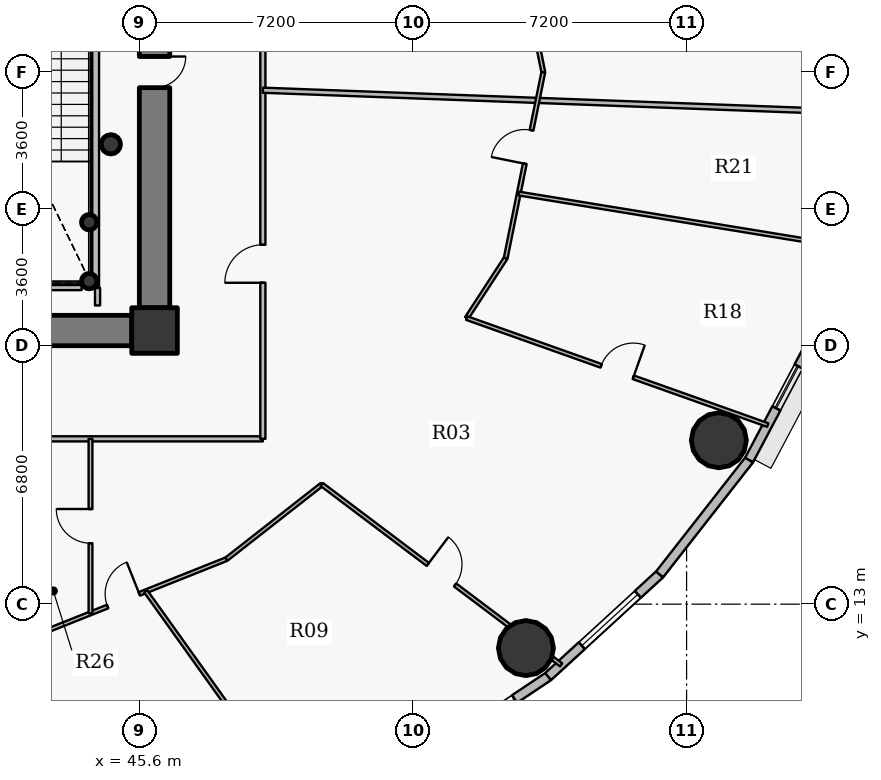
"""IFC4 building model, lengths in metres.
Left out: names, types, materials, properties, quantities, classifications, styles, units other than length and angle.
Written with IfcOpenShell. Run it as: python <this file> out.ifc"""

import sys

from ifc_helpers import new_model, si_unit, direction, frame, frame_2d, origin, origin_2d, place, context, subcontext, project, spatial, rectangle, hollow_circle, extrude, source, transform, mapped, element, fill, save


model = new_model("IFC4")
c1 = context("Model", 3, precision=1e-05, world=origin(), true_north=direction((0.0, 1.0)))
c2 = subcontext(c1, "Body", "Model", "MODEL_VIEW")
j1 = project(units=[si_unit("LENGTHUNIT", "METRE"), si_unit("PLANEANGLEUNIT", "RADIAN")], contexts=[c1])
p1 = place(None, origin())
s1 = spatial("IfcSite", under=j1, at=p1, CompositionType="ELEMENT")
p2 = place(p1, origin())
s2 = spatial("IfcBuilding", under=s1, at=p2, CompositionType="ELEMENT")
p3 = place(p2, frame((0.0, 0.0, 108.45)))
s3 = spatial("IfcBuildingStorey", under=s2, at=p3, CompositionType="ELEMENT", Elevation=108.45)
p4 = place(p3, frame((46.0, 20.2, 0.0), z_axis=(0.0, 0.0, 1.0), x_axis=(1.0, 0.0, 0.0)))
e1 = element("IfcColumn", 1, at=p4, inside=s3, PredefinedType="COLUMN", context=c2, shape_type="SweptSolid", body=[
    extrude(rectangle(XDim=1.2, YDim=1.2, at=origin_2d()), origin(), (0.0, 0.0, 1.0), 3.75),
])
for number, where, z_axis, x_axis in (
    (2, (44.28, 21.5, 0.0), (0.0, 0.0, 1.0), (1.0, 0.0, 0.0)),
    (3, (44.28, 23.05, 0.0), (0.0, 0.0, 1.0), (1.0, 0.0, 0.0)),
):
    element("IfcColumn", number, at=place(p3, frame(where, z_axis=z_axis, x_axis=x_axis)), inside=s3, PredefinedType="COLUMN", context=c2, shape_type="SweptSolid", body=[
        extrude(hollow_circle(Radius=0.203, WallThickness=0.016, at=origin_2d()), origin(), (0.0, 0.0, 1.0), 3.75),
    ])
p5 = place(p3, frame((46.0, 33.2, 0.0), z_axis=(0.0, 0.0, 1.0), x_axis=(0.0, -1.0, 0.0)))
e4 = element("IfcWall", 4, at=p5, inside=s3, PredefinedType="SHEAR", context=c2, shape_type="SweptSolid", body=[
    extrude(rectangle(XDim=12.4, YDim=0.8, at=frame_2d((6.2, 0.0))), origin(), (0.0, 0.0, 1.0), 2.95),
])
p6 = place(p5, frame((5.79, 0.0, 0.0)))
e5 = element("IfcOpeningElement", 5, at=p6, cuts=e4, PredefinedType="OPENING", context=c2, shape_type="SweptSolid", body=[
    extrude(rectangle(XDim=0.82, YDim=2.1, at=origin_2d()), frame((0.41, 0.41, 1.05), z_axis=(0.0, -1.0, 0.0), x_axis=(1.0, 0.0, 0.0)), (0.0, 0.0, 1.0), 0.82),
])
p7 = place(p3, frame((45.4, 20.2, 0.0), z_axis=(0.0, 0.0, 1.0), x_axis=(-1.0, 0.0, 0.0)))
e6 = element("IfcWall", 6, at=p7, inside=s3, PredefinedType="SHEAR", context=c2, shape_type="SweptSolid", body=[
    extrude(rectangle(XDim=18.8, YDim=0.8, at=frame_2d((9.4, 0.0))), origin(), (0.0, 0.0, 1.0), 2.95),
])
p8 = place(p7, frame((10.15, 0.0, 0.0)))
e7 = element("IfcOpeningElement", 7, at=p8, cuts=e6, PredefinedType="OPENING", context=c2, shape_type="SweptSolid", body=[
    extrude(rectangle(XDim=1.15, YDim=2.15, at=origin_2d()), frame((0.575, 0.41, 1.075), z_axis=(0.0, -1.0, 0.0), x_axis=(1.0, 0.0, 0.0)), (0.0, 0.0, 1.0), 0.82),
])
for number, where, z_axis, x_axis in (
    (8, (55.773, 11.844, 0.0), (0.0, 0.0, 1.0), (1.0, 0.0, 0.0)),
    (9, (60.849, 17.312, 0.0), (0.0, 0.0, 1.0), (1.0, 0.0, 0.0)),
):
    element("IfcColumn", number, at=place(p3, frame(where, z_axis=z_axis, x_axis=x_axis)), inside=s3, PredefinedType="COLUMN", context=c2, shape_type="SweptSolid", body=[
        extrude(hollow_circle(Radius=0.725, WallThickness=0.042, at=origin_2d()), origin(), (0.0, 0.0, 1.0), 3.75),
    ])
p9 = place(p3, frame((44.85, 25.1, 0.0), z_axis=(0.0, 0.0, 1.0), x_axis=(1.0, 0.0, 0.0)))
e10 = element("IfcColumn", 10, at=p9, inside=s3, PredefinedType="COLUMN", context=c2, shape_type="SweptSolid", body=[
    extrude(hollow_circle(Radius=0.254, WallThickness=0.02, at=origin_2d()), origin(), (0.0, 0.0, 1.0), 3.75),
])
p10 = place(p3, frame((56.358, 11.097, 0.0), z_axis=(0.0, 0.0, 1.0), x_axis=(-0.831221811447, -0.555940914284, 0.0)))
e11 = element("IfcWall", 11, at=p10, inside=s3, PredefinedType="SOLIDWALL", context=c2, shape_type="SweptSolid", body=[
    extrude(rectangle(XDim=4.13, YDim=0.24, at=frame_2d((2.065, 0.0))), origin(), (0.0, 0.0, 1.0), 3.5),
])
p11 = place(p10, frame((1.065, 0.0, 0.9)))
e12 = element("IfcOpeningElement", 12, at=p11, cuts=e11, PredefinedType="OPENING", context=c2, shape_type="SweptSolid", body=[
    extrude(rectangle(XDim=2.0, YDim=1.75, at=origin_2d()), frame((1.0, 0.13, 0.875), z_axis=(0.0, -1.0, 0.0), x_axis=(1.0, 0.0, 0.0)), (0.0, 0.0, 1.0), 0.26),
])
p12 = place(p3, frame((59.289, 13.783, 0.0), z_axis=(0.0, 0.0, 1.0), x_axis=(-0.737113356241, -0.675769117414, 0.0)))
e13 = element("IfcWall", 13, at=p12, inside=s3, PredefinedType="SOLIDWALL", context=c2, shape_type="SweptSolid", body=[
    extrude(rectangle(XDim=3.976, YDim=0.24, at=frame_2d((1.988, 0.0))), origin(), (0.0, 0.0, 1.0), 3.5),
])
p13 = place(p12, frame((0.776, 0.0, 0.9)))
e14 = element("IfcOpeningElement", 14, at=p13, cuts=e13, PredefinedType="OPENING", context=c2, shape_type="SweptSolid", body=[
    extrude(rectangle(XDim=2.0, YDim=1.75, at=origin_2d()), frame((1.0, 0.13, 0.875), z_axis=(0.0, -1.0, 0.0), x_axis=(1.0, 0.0, 0.0)), (0.0, 0.0, 1.0), 0.26),
])
p14 = place(p3, frame((61.645, 16.794, 0.0), z_axis=(0.0, 0.0, 1.0), x_axis=(-0.616272103517, -0.787533297345, 0.0)))
e15 = element("IfcWall", 15, at=p14, inside=s3, PredefinedType="SOLIDWALL", context=c2, shape_type="SweptSolid", body=[
    extrude(rectangle(XDim=3.823, YDim=0.24, at=frame_2d((1.912, 0.0))), origin(), (0.0, 0.0, 1.0), 3.5),
])
p15 = place(p3, frame((63.37, 20.055, 0.0), z_axis=(0.0, 0.0, 1.0), x_axis=(-0.467614004126, -0.883932770716, 0.0)))
e16 = element("IfcWall", 16, at=p15, inside=s3, PredefinedType="SOLIDWALL", context=c2, shape_type="SweptSolid", body=[
    extrude(rectangle(XDim=3.689, YDim=0.24, at=frame_2d((1.844, 0.0))), origin(), (0.0, 0.0, 1.0), 3.5),
])
p16 = place(p15, frame((0.904, 0.0, 0.9)))
e17 = element("IfcOpeningElement", 17, at=p16, cuts=e16, PredefinedType="OPENING", context=c2, shape_type="SweptSolid", body=[
    extrude(rectangle(XDim=1.25, YDim=1.65, at=origin_2d()), frame((0.625, 0.13, 0.825), z_axis=(0.0, -1.0, 0.0), x_axis=(1.0, 0.0, 0.0)), (0.0, 0.0, 1.0), 0.26),
])
p17 = place(p3, frame((38.477, 17.35, 0.0), z_axis=(0.0, 0.0, 1.0), x_axis=(1.0, 0.0, 0.0)))
e18 = element("IfcWall", 18, at=p17, inside=s3, PredefinedType="PARTITIONING", context=c2, shape_type="SweptSolid", body=[
    extrude(rectangle(XDim=10.373, YDim=0.135, at=frame_2d((5.187, 0.0))), origin(), (0.0, 0.0, 1.0), 2.935),
])
p18 = place(p3, frame((42.251, 11.934, 0.0), z_axis=(0.0, 0.0, 1.0), x_axis=(0.928803554156, 0.370572473055, 0.0)))
e19 = element("IfcWall", 19, at=p18, inside=s3, PredefinedType="PARTITIONING", context=c2, shape_type="SweptSolid", body=[
    extrude(rectangle(XDim=6.072, YDim=0.1, at=frame_2d((3.036, 0.0))), origin(), (0.0, 0.0, 1.0), 2.935),
])
p19 = place(p18, frame((2.705, 0.0, 0.0)))
e20 = element("IfcOpeningElement", 20, at=p19, cuts=e19, PredefinedType="OPENING", context=c2, shape_type="SweptSolid", body=[
    extrude(rectangle(XDim=0.9, YDim=2.1, at=origin_2d()), frame((0.45, 0.06, 1.05), z_axis=(0.0, -1.0, 0.0), x_axis=(1.0, 0.0, 0.0)), (0.0, 0.0, 1.0), 0.12),
])
p20 = place(p3, frame((44.315, 12.758, 0.0), z_axis=(0.0, 0.0, 1.0), x_axis=(0.0, 1.0, 0.0)))
e21 = element("IfcWall", 21, at=p20, inside=s3, PredefinedType="PARTITIONING", context=c2, shape_type="SweptSolid", body=[
    extrude(rectangle(XDim=4.593, YDim=0.1, at=frame_2d((2.296, 0.0))), origin(), (0.0, 0.0, 1.0), 3.5),
])
p21 = place(p20, frame((1.846, 0.0, 0.0)))
e22 = element("IfcOpeningElement", 22, at=p21, cuts=e21, PredefinedType="OPENING", context=c2, shape_type="SweptSolid", body=[
    extrude(rectangle(XDim=0.9, YDim=2.1, at=origin_2d()), frame((0.45, 0.06, 1.05), z_axis=(0.0, -1.0, 0.0), x_axis=(1.0, 0.0, 0.0)), (0.0, 0.0, 1.0), 0.12),
])
p22 = place(p3, frame((44.44, 21.33, 0.0), z_axis=(0.0, 0.0, 1.0), x_axis=(0.0, 1.0, 0.0)))
e23 = element("IfcWall", 23, at=p22, inside=s3, PredefinedType="PARTITIONING", context=c2, shape_type="SweptSolid", body=[
    extrude(rectangle(XDim=8.52, YDim=0.2, at=frame_2d((4.26, 0.0))), origin(), (0.0, 0.0, 1.0), 3.5),
])
p23 = place(p3, frame((45.768, 13.337, 0.0), z_axis=(0.0, 0.0, 1.0), x_axis=(0.581582931767, -0.813487119429, 0.0)))
e24 = element("IfcWall", 24, at=p23, inside=s3, PredefinedType="PARTITIONING", context=c2, shape_type="SweptSolid", body=[
    extrude(rectangle(XDim=7.301, YDim=0.1, at=frame_2d((3.65, 0.0))), origin(), (0.0, 0.0, 1.0), 2.935),
])
p24 = place(p3, frame((47.891, 14.184, 0.0), z_axis=(0.0, 0.0, 1.0), x_axis=(0.787351391371, 0.616504490256, 0.0)))
e25 = element("IfcWall", 25, at=p24, inside=s3, PredefinedType="PARTITIONING", context=c2, shape_type="SweptSolid", body=[
    extrude(rectangle(XDim=3.187, YDim=0.1, at=frame_2d((1.593, 0.0))), origin(), (0.0, 0.0, 1.0), 2.935),
])
p25 = place(p3, frame((48.85, 17.35, 0.0), z_axis=(0.0, 0.0, 1.0), x_axis=(0.0, 1.0, 0.0)))
e26 = element("IfcWall", 26, at=p25, inside=s3, PredefinedType="PARTITIONING", context=c2, shape_type="SweptSolid", body=[
    extrude(rectangle(XDim=19.3, YDim=0.135, at=frame_2d((9.65, 0.0))), origin(), (0.0, 0.0, 1.0), 2.935),
])
p26 = place(p25, frame((4.107, 0.0, 0.0)))
e27 = element("IfcOpeningElement", 27, at=p26, cuts=e26, PredefinedType="OPENING", context=c2, shape_type="SweptSolid", body=[
    extrude(rectangle(XDim=1.0, YDim=2.15, at=origin_2d()), frame((0.5, 0.078, 1.075), z_axis=(0.0, -1.0, 0.0), x_axis=(1.0, 0.0, 0.0)), (0.0, 0.0, 1.0), 0.155),
])
p27 = place(p25, frame((13.717, 0.0, 0.0)))
e28 = element("IfcOpeningElement", 28, at=p27, cuts=e26, PredefinedType="OPENING", context=c2, shape_type="SweptSolid", body=[
    extrude(rectangle(XDim=1.0, YDim=2.15, at=origin_2d()), frame((0.5, 0.078, 1.075), z_axis=(0.0, -1.0, 0.0), x_axis=(1.0, 0.0, 0.0)), (0.0, 0.0, 1.0), 0.155),
])
p28 = place(p3, frame((48.85, 26.523, 0.0), z_axis=(0.0, 0.0, 1.0), x_axis=(0.999312212169, -0.03708237599, 0.0)))
e29 = element("IfcWall", 29, at=p28, inside=s3, PredefinedType="PARTITIONING", context=c2, shape_type="SweptSolid", body=[
    extrude(rectangle(XDim=15.834, YDim=0.135, at=frame_2d((7.917, 0.0))), origin(), (0.0, 0.0, 1.0), 2.935),
])
p29 = place(p3, frame((50.4, 16.149, 0.0), z_axis=(0.0, 0.0, 1.0), x_axis=(0.79862729849, -0.601825920102, 0.0)))
e30 = element("IfcWall", 30, at=p29, inside=s3, PredefinedType="PARTITIONING", context=c2, shape_type="SweptSolid", body=[
    extrude(rectangle(XDim=7.887, YDim=0.1, at=frame_2d((3.944, 0.0))), origin(), (0.0, 0.0, 1.0), 2.935),
])
p30 = place(p29, frame((3.494, 0.0, 0.0)))
e31 = element("IfcOpeningElement", 31, at=p30, cuts=e30, PredefinedType="OPENING", context=c2, shape_type="SweptSolid", body=[
    extrude(rectangle(XDim=0.9, YDim=2.1, at=origin_2d()), frame((0.45, 0.06, 1.05), z_axis=(0.0, -1.0, 0.0), x_axis=(1.0, 0.0, 0.0)), (0.0, 0.0, 1.0), 0.12),
])
p31 = place(p3, frame((54.214, 20.528, 0.0), z_axis=(0.0, 0.0, 1.0), x_axis=(0.545444312607, 0.838147064568, 0.0)))
e32 = element("IfcWall", 32, at=p31, inside=s3, PredefinedType="PARTITIONING", context=c2, shape_type="SweptSolid", body=[
    extrude(rectangle(XDim=1.882, YDim=0.1, at=frame_2d((0.941, 0.0))), origin(), (0.0, 0.0, 1.0), 3.5),
])
p32 = place(p3, frame((54.214, 20.528, 0.0), z_axis=(0.0, 0.0, 1.0), x_axis=(0.942277402903, -0.334833236073, 0.0)))
e33 = element("IfcWall", 33, at=p32, inside=s3, PredefinedType="PARTITIONING", context=c2, shape_type="SweptSolid", body=[
    extrude(rectangle(XDim=8.408, YDim=0.1, at=frame_2d((4.204, 0.0))), origin(), (0.0, 0.0, 1.0), 2.935),
])
p33 = place(p32, frame((3.754, 0.0, 0.0)))
e34 = element("IfcOpeningElement", 34, at=p33, cuts=e33, PredefinedType="OPENING", context=c2, shape_type="SweptSolid", body=[
    extrude(rectangle(XDim=0.9, YDim=2.1, at=origin_2d()), frame((0.45, 0.06, 1.05), z_axis=(0.0, -1.0, 0.0), x_axis=(1.0, 0.0, 0.0)), (0.0, 0.0, 1.0), 0.12),
])
p34 = place(p3, frame((55.24, 22.105, 0.0), z_axis=(0.0, 0.0, 1.0), x_axis=(0.198230919145, 0.980155346205, 0.0)))
e35 = element("IfcWall", 35, at=p34, inside=s3, PredefinedType="PARTITIONING", context=c2, shape_type="SweptSolid", body=[
    extrude(rectangle(XDim=4.994, YDim=0.1, at=frame_2d((2.497, 0.0))), origin(), (0.0, 0.0, 1.0), 2.935),
])
p35 = place(p34, frame((2.534, 0.0, 0.0)))
e36 = element("IfcOpeningElement", 36, at=p35, cuts=e35, PredefinedType="OPENING", context=c2, shape_type="SweptSolid", body=[
    extrude(rectangle(XDim=0.9, YDim=2.1, at=origin_2d()), frame((0.45, 0.06, 1.05), z_axis=(0.0, -1.0, 0.0), x_axis=(1.0, 0.0, 0.0)), (0.0, 0.0, 1.0), 0.12),
])
p36 = place(p3, frame((55.24, 31.895, 0.0), z_axis=(0.0, 0.0, 1.0), x_axis=(0.19822142127, -0.980157267049, 0.0)))
e37 = element("IfcWall", 37, at=p36, inside=s3, PredefinedType="PARTITIONING", context=c2, shape_type="SweptSolid", body=[
    extrude(rectangle(XDim=4.994, YDim=0.1, at=frame_2d((2.497, 0.0))), origin(), (0.0, 0.0, 1.0), 2.935),
])
p37 = place(p36, frame((3.045, 0.0, 0.0)))
e38 = element("IfcOpeningElement", 38, at=p37, cuts=e37, PredefinedType="OPENING", context=c2, shape_type="SweptSolid", body=[
    extrude(rectangle(XDim=0.9, YDim=2.1, at=origin_2d()), frame((0.45, 0.06, 1.05), z_axis=(0.0, -1.0, 0.0), x_axis=(1.0, 0.0, 0.0)), (0.0, 0.0, 1.0), 0.12),
])
p38 = place(p3, frame((55.583, 23.804, 0.0), z_axis=(0.0, 0.0, 1.0), x_axis=(0.986943531615, -0.161066648946, 0.0)))
e39 = element("IfcWall", 39, at=p38, inside=s3, PredefinedType="PARTITIONING", context=c2, shape_type="SweptSolid", body=[
    extrude(rectangle(XDim=8.628, YDim=0.1, at=frame_2d((4.314, 0.0))), origin(), (0.0, 0.0, 1.0), 2.935),
])
p39 = place(p3, frame((44.08, 21.33, 0.0), z_axis=(0.0, 0.0, 1.0), x_axis=(-1.0, 0.0, 0.0)))
e40 = element("IfcWall", 40, at=p39, inside=s3, PredefinedType="PARTITIONING", context=c2, shape_type="SweptSolid", body=[
    extrude(rectangle(XDim=2.82, YDim=0.135, at=frame_2d((1.41, 0.0))), origin(), (0.0, 0.0, 1.0), 3.035),
])
p40 = place(p3, frame((44.5, 20.86, 0.0), z_axis=(0.0, 0.0, 1.0), x_axis=(0.0, 1.0, 0.0)))
e41 = element("IfcWall", 41, at=p40, inside=s3, PredefinedType="PARTITIONING", context=c2, shape_type="SweptSolid", body=[
    extrude(rectangle(XDim=0.46, YDim=0.135, at=frame_2d((0.23, 0.0))), origin(), (0.0, 0.0, 1.0), 3.5),
])
p41 = place(p3, frame((45.41, 19.8, 0.0), z_axis=(0.0, 0.0, 1.0), x_axis=(1.0, 0.0, 0.0)))
e42 = element("IfcWall", 42, at=p41, inside=s3, PredefinedType="PARTITIONING", context=c2, shape_type="SweptSolid", body=[
    extrude(rectangle(XDim=0.99, YDim=0.135, at=frame_2d((0.495, 0.0))), origin(), (0.0, 0.0, 1.0), 2.935),
])
p42 = place(p3, frame((46.4, 20.107, 0.0), z_axis=(0.0, 0.0, 1.0), x_axis=(0.0, 1.0, 0.0)))
e43 = element("IfcWall", 43, at=p42, inside=s3, PredefinedType="PARTITIONING", context=c2, shape_type="SweptSolid", body=[
    extrude(rectangle(XDim=0.683, YDim=0.135, at=frame_2d((0.341, 0.0))), origin(), (0.0, 0.0, 1.0), 3.5),
])
m1 = source(origin(), c2, "Body", "SweptSolid", [
    extrude(rectangle(XDim=2.0, YDim=1.75, at=origin_2d()), frame((1.0, 0.03, 0.875), z_axis=(0.0, -1.0, 0.0), x_axis=(1.0, 0.0, 0.0)), (0.0, 0.0, 1.0), 0.06),
])
p43 = place(p11, origin())
e44 = element("IfcWindow", 44, at=p43, inside=s3, PartitioningType="DOUBLE_PANEL_VERTICAL", PredefinedType="WINDOW", context=c2, shape_type="MappedRepresentation", body=[
    mapped(m1, transform((0.0, 0.0, 0.0), x_axis=(1.0, 0.0, 0.0), y_axis=(0.0, 1.0, 0.0), z_axis=(0.0, 0.0, 1.0), scale=1.0)),
])
fill(e12, e44)
p44 = place(p13, origin())
e45 = element("IfcWindow", 45, at=p44, inside=s3, PartitioningType="DOUBLE_PANEL_VERTICAL", PredefinedType="WINDOW", context=c2, shape_type="MappedRepresentation", body=[
    mapped(m1, transform((0.0, 0.0, 0.0), x_axis=(1.0, 0.0, 0.0), y_axis=(0.0, 1.0, 0.0), z_axis=(0.0, 0.0, 1.0), scale=1.0)),
])
fill(e14, e45)
m2 = source(origin(), c2, "Body", "SweptSolid", [
    extrude(rectangle(XDim=1.25, YDim=1.65, at=origin_2d()), frame((0.625, 0.03, 0.825), z_axis=(0.0, -1.0, 0.0), x_axis=(1.0, 0.0, 0.0)), (0.0, 0.0, 1.0), 0.06),
])
p45 = place(p16, origin())
e46 = element("IfcWindow", 46, at=p45, inside=s3, PartitioningType="SINGLE_PANEL", PredefinedType="WINDOW", context=c2, shape_type="MappedRepresentation", body=[
    mapped(m2, transform((0.0, 0.0, 0.0), x_axis=(1.0, 0.0, 0.0), y_axis=(0.0, 1.0, 0.0), z_axis=(0.0, 0.0, 1.0), scale=1.0)),
])
fill(e17, e46)
m3 = source(origin(), c2, "Body", "SweptSolid", [
    extrude(rectangle(XDim=0.82, YDim=2.1, at=origin_2d()), frame((0.41, 0.025, 1.05), z_axis=(0.0, -1.0, 0.0), x_axis=(1.0, 0.0, 0.0)), (0.0, 0.0, 1.0), 0.05),
])
p46 = place(p6, origin())
e47 = element("IfcDoor", 47, at=p46, inside=s3, OperationType="SINGLE_SWING_LEFT", PredefinedType="DOOR", context=c2, shape_type="MappedRepresentation", body=[
    mapped(m3, transform((0.0, 0.0, 0.0), x_axis=(1.0, 0.0, 0.0), y_axis=(0.0, 1.0, 0.0), z_axis=(0.0, 0.0, 1.0), scale=1.0)),
])
fill(e5, e47)
m4 = source(origin(), c2, "Body", "SweptSolid", [
    extrude(rectangle(XDim=1.0, YDim=2.15, at=origin_2d()), frame((0.5, 0.025, 1.075), z_axis=(0.0, -1.0, 0.0), x_axis=(1.0, 0.0, 0.0)), (0.0, 0.0, 1.0), 0.05),
])
p47 = place(p26, origin())
e48 = element("IfcDoor", 48, at=p47, inside=s3, OperationType="SINGLE_SWING_LEFT", PredefinedType="DOOR", context=c2, shape_type="MappedRepresentation", body=[
    mapped(m4, transform((0.0, 0.0, 0.0), x_axis=(1.0, 0.0, 0.0), y_axis=(0.0, 1.0, 0.0), z_axis=(0.0, 0.0, 1.0), scale=1.0)),
])
fill(e27, e48)
m5 = source(origin(), c2, "Body", "SweptSolid", [
    extrude(rectangle(XDim=0.9, YDim=2.1, at=origin_2d()), frame((0.45, 0.025, 1.05), z_axis=(0.0, -1.0, 0.0), x_axis=(1.0, 0.0, 0.0)), (0.0, 0.0, 1.0), 0.05),
])
p48 = place(p19, origin())
e49 = element("IfcDoor", 49, at=p48, inside=s3, OperationType="SINGLE_SWING_RIGHT", PredefinedType="DOOR", context=c2, shape_type="MappedRepresentation", body=[
    mapped(m5, transform((0.0, 0.0, 0.0), x_axis=(1.0, 0.0, 0.0), y_axis=(0.0, 1.0, 0.0), z_axis=(0.0, 0.0, 1.0), scale=1.0)),
])
fill(e20, e49)
p49 = place(p30, origin())
e50 = element("IfcDoor", 50, at=p49, inside=s3, OperationType="SINGLE_SWING_LEFT", PredefinedType="DOOR", context=c2, shape_type="MappedRepresentation", body=[
    mapped(m5, transform((0.0, 0.0, 0.0), x_axis=(1.0, 0.0, 0.0), y_axis=(0.0, 1.0, 0.0), z_axis=(0.0, 0.0, 1.0), scale=1.0)),
])
fill(e31, e50)
p50 = place(p33, origin())
e51 = element("IfcDoor", 51, at=p50, inside=s3, OperationType="SINGLE_SWING_RIGHT", PredefinedType="DOOR", context=c2, shape_type="MappedRepresentation", body=[
    mapped(m5, transform((0.0, 0.0, 0.0), x_axis=(1.0, 0.0, 0.0), y_axis=(0.0, 1.0, 0.0), z_axis=(0.0, 0.0, 1.0), scale=1.0)),
])
fill(e34, e51)
p51 = place(p35, origin())
e52 = element("IfcDoor", 52, at=p51, inside=s3, OperationType="SINGLE_SWING_LEFT", PredefinedType="DOOR", context=c2, shape_type="MappedRepresentation", body=[
    mapped(m5, transform((0.0, 0.0, 0.0), x_axis=(1.0, 0.0, 0.0), y_axis=(0.0, 1.0, 0.0), z_axis=(0.0, 0.0, 1.0), scale=1.0)),
])
fill(e36, e52)
p52 = place(p21, origin())
e53 = element("IfcDoor", 53, at=p52, inside=s3, OperationType="SINGLE_SWING_RIGHT", PredefinedType="DOOR", context=c2, shape_type="MappedRepresentation", body=[
    mapped(m5, transform((0.0, 0.0, 0.0), x_axis=(1.0, 0.0, 0.0), y_axis=(0.0, 1.0, 0.0), z_axis=(0.0, 0.0, 1.0), scale=1.0)),
])
fill(e22, e53)
save(model, sys.argv[1])
